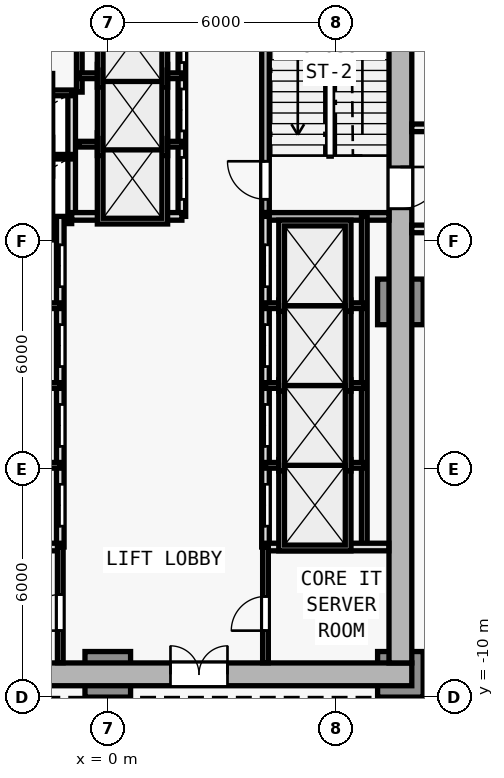
"""IFC4 building model, lengths in metres.
Left out: names, types, materials, properties, quantities, classifications, styles, units other than length and angle.
Written with IfcOpenShell. Run it as: python <this file> out.ifc"""

import sys

from ifc_helpers import new_model, si_unit, direction, frame, frame_2d, origin, origin_2d, place, context, subcontext, project, spatial, rectangle, extrude, element, fill, save


model = new_model("IFC4")
c1 = context("Model", 3, precision=1e-05, world=origin(), true_north=direction((0.0, 1.0)))
c2 = subcontext(c1, "Body", "Model", "MODEL_VIEW")
j1 = project(units=[si_unit("LENGTHUNIT", "METRE"), si_unit("PLANEANGLEUNIT", "RADIAN")], contexts=[c1])
p1 = place(None, origin())
s1 = spatial("IfcSite", under=j1, at=p1, CompositionType="ELEMENT")
p2 = place(p1, origin())
s2 = spatial("IfcBuilding", under=s1, at=p2, CompositionType="ELEMENT")
p3 = place(p2, origin())
s3 = spatial("IfcBuildingStorey", under=s2, at=p3, CompositionType="ELEMENT", Elevation=0.0)
for number, where, z_axis, x_axis in (
    (1, (7.7, -9.4, 0.0), (0.0, 0.0, 1.0), (1.0, 0.0, 0.0)),
    (2, (0.0, -9.4, 0.0), (0.0, 0.0, 1.0), (1.0, 0.0, 0.0)),
    (3, (7.7, 0.4, 0.0), (0.0, 0.0, 1.0), (1.0, 0.0, 0.0)),
):
    element("IfcColumn", number, at=place(p3, frame(where, z_axis=z_axis, x_axis=x_axis)), inside=s3, PredefinedType="COLUMN", context=c2, shape_type="SweptSolid", body=[
        extrude(rectangle(XDim=1.2, YDim=1.2, at=origin_2d()), origin(), (0.0, 0.0, 1.0), 5.0),
    ])
p4 = place(p3, frame((-8.0, -9.4, 0.0), z_axis=(0.0, 0.0, 1.0), x_axis=(1.0, 0.0, 0.0)))
e4 = element("IfcWall", 4, at=p4, inside=s3, PredefinedType="SHEAR", context=c2, shape_type="SweptSolid", body=[
    extrude(rectangle(XDim=16.0, YDim=0.6, at=frame_2d((8.0, 0.0))), origin(), (0.0, 0.0, 1.0), 4.72),
])
p5 = place(p4, frame((9.65, 0.0, 0.0)))
e5 = element("IfcOpeningElement", 5, at=p5, cuts=e4, PredefinedType="OPENING", context=c2, shape_type="SweptSolid", body=[
    extrude(rectangle(XDim=1.5, YDim=2.2, at=frame_2d((0.75, 1.1))), frame((0.0, 0.31, 0.0), z_axis=(0.0, -1.0, 0.0), x_axis=(1.0, 0.0, 0.0)), (0.0, 0.0, 1.0), 0.62),
])
p6 = place(p3, frame((7.7, 9.9, 0.0), z_axis=(0.0, 0.0, 1.0), x_axis=(0.0, -1.0, 0.0)))
e6 = element("IfcWall", 6, at=p6, inside=s3, PredefinedType="SHEAR", context=c2, shape_type="SweptSolid", body=[
    extrude(rectangle(XDim=19.0, YDim=0.6, at=frame_2d((9.5, 0.0))), origin(), (0.0, 0.0, 1.0), 4.72),
])
p7 = place(p6, frame((5.95, 0.0, 0.0)))
e7 = element("IfcOpeningElement", 7, at=p7, cuts=e6, PredefinedType="OPENING", context=c2, shape_type="SweptSolid", body=[
    extrude(rectangle(XDim=1.1, YDim=2.15, at=frame_2d((0.55, 1.075))), frame((0.0, 0.31, 0.0), z_axis=(0.0, -1.0, 0.0), x_axis=(1.0, 0.0, 0.0)), (0.0, 0.0, 1.0), 0.62),
])
p8 = place(p3, frame((4.15, 2.75, 0.0), z_axis=(0.0, 0.0, 1.0), x_axis=(0.0, 1.0, 0.0)))
e8 = element("IfcWall", 8, at=p8, inside=s3, PredefinedType="SOLIDWALL", context=c2, shape_type="SweptSolid", body=[
    extrude(rectangle(XDim=7.15, YDim=0.2, at=frame_2d((3.575, 0.0))), origin(), (0.0, 0.0, 1.0), 4.72),
])
p9 = place(p8, frame((0.35, 0.0, 0.0)))
e9 = element("IfcOpeningElement", 9, at=p9, cuts=e8, PredefinedType="OPENING", context=c2, shape_type="SweptSolid", body=[
    extrude(rectangle(XDim=1.0, YDim=2.15, at=frame_2d((0.5, 1.075))), frame((0.0, 0.11, 0.0), z_axis=(0.0, -1.0, 0.0), x_axis=(1.0, 0.0, 0.0)), (0.0, 0.0, 1.0), 0.22),
])
p10 = place(p3, frame((4.05, 2.65, 0.0), z_axis=(0.0, 0.0, 1.0), x_axis=(1.0, 0.0, 0.0)))
e10 = element("IfcWall", 10, at=p10, inside=s3, PredefinedType="SOLIDWALL", context=c2, shape_type="SweptSolid", body=[
    extrude(rectangle(XDim=3.35, YDim=0.2, at=frame_2d((1.675, 0.0))), origin(), (0.0, 0.0, 1.0), 4.72),
])
p11 = place(p3, frame((-0.95, 2.65, 0.0), z_axis=(0.0, 0.0, 1.0), x_axis=(0.0, 1.0, 0.0)))
e11 = element("IfcWall", 11, at=p11, inside=s3, PredefinedType="SOLIDWALL", context=c2, shape_type="SweptSolid", body=[
    extrude(rectangle(XDim=3.27, YDim=0.2, at=frame_2d((1.635, 0.0))), origin(), (0.0, 0.0, 1.0), 4.72),
])
for number, where, z_axis, x_axis in (
    (12, (-3.85, 2.52, 0.0), (0.0, 0.0, 1.0), (1.0, 0.0, 0.0)),
    (13, (-3.85, 4.22, 0.0), (0.0, 0.0, 1.0), (1.0, 0.0, 0.0)),
):
    element("IfcWall", number, at=place(p3, frame(where, z_axis=z_axis, x_axis=x_axis)), inside=s3, PredefinedType="PARTITIONING", context=c2, shape_type="SweptSolid", body=[
        extrude(rectangle(XDim=2.9, YDim=0.12, at=frame_2d((1.45, 0.0))), origin(), (0.0, 0.0, 1.0), 4.72),
    ])
p12 = place(p3, frame((-3.85, 5.9, 0.0), z_axis=(0.0, 0.0, 1.0), x_axis=(1.0, 0.0, 0.0)))
e14 = element("IfcWall", 14, at=p12, inside=s3, PredefinedType="PARTITIONING", context=c2, shape_type="SweptSolid", body=[
    extrude(rectangle(XDim=2.9, YDim=0.15, at=frame_2d((1.45, 0.0))), origin(), (0.0, 0.0, 1.0), 4.72),
])
p13 = place(p3, frame((4.15, -6.05, 0.0), z_axis=(0.0, 0.0, 1.0), x_axis=(0.0, 1.0, 0.0)))
e15 = element("IfcWall", 15, at=p13, inside=s3, PredefinedType="SOLIDWALL", context=c2, shape_type="SweptSolid", body=[
    extrude(rectangle(XDim=8.7, YDim=0.2, at=frame_2d((4.35, 0.0))), origin(), (0.0, 0.0, 1.0), 4.72),
])
p14 = place(p13, frame((0.55, 0.0, 0.0)))
e16 = element("IfcOpeningElement", 16, at=p14, cuts=e15, PredefinedType="OPENING", context=c2, shape_type="SweptSolid", body=[
    extrude(rectangle(XDim=1.1, YDim=2.15, at=frame_2d((0.55, 1.075))), frame((0.0, 0.11, 0.0), z_axis=(0.0, -1.0, 0.0), x_axis=(1.0, 0.0, 0.0)), (0.0, 0.0, 1.0), 0.22),
])
p15 = place(p13, frame((2.65, 0.0, 0.0)))
e17 = element("IfcOpeningElement", 17, at=p15, cuts=e15, PredefinedType="OPENING", context=c2, shape_type="SweptSolid", body=[
    extrude(rectangle(XDim=1.1, YDim=2.15, at=frame_2d((0.55, 1.075))), frame((0.0, 0.11, 0.0), z_axis=(0.0, -1.0, 0.0), x_axis=(1.0, 0.0, 0.0)), (0.0, 0.0, 1.0), 0.22),
])
p16 = place(p13, frame((4.75, 0.0, 0.0)))
e18 = element("IfcOpeningElement", 18, at=p16, cuts=e15, PredefinedType="OPENING", context=c2, shape_type="SweptSolid", body=[
    extrude(rectangle(XDim=1.1, YDim=2.15, at=frame_2d((0.55, 1.075))), frame((0.0, 0.11, 0.0), z_axis=(0.0, -1.0, 0.0), x_axis=(1.0, 0.0, 0.0)), (0.0, 0.0, 1.0), 0.22),
])
p17 = place(p13, frame((6.85, 0.0, 0.0)))
e19 = element("IfcOpeningElement", 19, at=p17, cuts=e15, PredefinedType="OPENING", context=c2, shape_type="SweptSolid", body=[
    extrude(rectangle(XDim=1.1, YDim=2.15, at=frame_2d((0.55, 1.075))), frame((0.0, 0.11, 0.0), z_axis=(0.0, -1.0, 0.0), x_axis=(1.0, 0.0, 0.0)), (0.0, 0.0, 1.0), 0.22),
])
p18 = place(p3, frame((6.75, -6.05, 0.0), z_axis=(0.0, 0.0, 1.0), x_axis=(0.0, 1.0, 0.0)))
e20 = element("IfcWall", 20, at=p18, inside=s3, PredefinedType="PARTITIONING", context=c2, shape_type="SweptSolid", body=[
    extrude(rectangle(XDim=8.7, YDim=0.15, at=frame_2d((4.35, 0.0))), origin(), (0.0, 0.0, 1.0), 4.72),
])
for number, where, z_axis, x_axis in (
    (21, (4.15, -3.9, 0.0), (0.0, 0.0, 1.0), (1.0, 0.0, 0.0)),
    (22, (4.15, -1.8, 0.0), (0.0, 0.0, 1.0), (1.0, 0.0, 0.0)),
    (23, (4.15, 0.3, 0.0), (0.0, 0.0, 1.0), (1.0, 0.0, 0.0)),
):
    element("IfcWall", number, at=place(p3, frame(where, z_axis=z_axis, x_axis=x_axis)), inside=s3, PredefinedType="PARTITIONING", context=c2, shape_type="SweptSolid", body=[
        extrude(rectangle(XDim=2.6, YDim=0.15, at=frame_2d((1.3, 0.0))), origin(), (0.0, 0.0, 1.0), 4.72),
    ])
p19 = place(p3, frame((-1.25, -6.05, 0.0), z_axis=(0.0, 0.0, 1.0), x_axis=(0.0, 1.0, 0.0)))
e24 = element("IfcWall", 24, at=p19, inside=s3, PredefinedType="SOLIDWALL", context=c2, shape_type="SweptSolid", body=[
    extrude(rectangle(XDim=8.7, YDim=0.2, at=frame_2d((4.35, 0.0))), origin(), (0.0, 0.0, 1.0), 4.72),
])
p20 = place(p19, frame((0.55, 0.0, 0.0)))
e25 = element("IfcOpeningElement", 25, at=p20, cuts=e24, PredefinedType="OPENING", context=c2, shape_type="SweptSolid", body=[
    extrude(rectangle(XDim=1.1, YDim=2.15, at=frame_2d((0.55, 1.075))), frame((0.0, 0.11, 0.0), z_axis=(0.0, -1.0, 0.0), x_axis=(1.0, 0.0, 0.0)), (0.0, 0.0, 1.0), 0.22),
])
p21 = place(p19, frame((2.65, 0.0, 0.0)))
e26 = element("IfcOpeningElement", 26, at=p21, cuts=e24, PredefinedType="OPENING", context=c2, shape_type="SweptSolid", body=[
    extrude(rectangle(XDim=1.1, YDim=2.15, at=frame_2d((0.55, 1.075))), frame((0.0, 0.11, 0.0), z_axis=(0.0, -1.0, 0.0), x_axis=(1.0, 0.0, 0.0)), (0.0, 0.0, 1.0), 0.22),
])
p22 = place(p19, frame((4.75, 0.0, 0.0)))
e27 = element("IfcOpeningElement", 27, at=p22, cuts=e24, PredefinedType="OPENING", context=c2, shape_type="SweptSolid", body=[
    extrude(rectangle(XDim=1.1, YDim=2.15, at=frame_2d((0.55, 1.075))), frame((0.0, 0.11, 0.0), z_axis=(0.0, -1.0, 0.0), x_axis=(1.0, 0.0, 0.0)), (0.0, 0.0, 1.0), 0.22),
])
p23 = place(p19, frame((6.85, 0.0, 0.0)))
e28 = element("IfcOpeningElement", 28, at=p23, cuts=e24, PredefinedType="OPENING", context=c2, shape_type="SweptSolid", body=[
    extrude(rectangle(XDim=1.1, YDim=2.15, at=frame_2d((0.55, 1.075))), frame((0.0, 0.11, 0.0), z_axis=(0.0, -1.0, 0.0), x_axis=(1.0, 0.0, 0.0)), (0.0, 0.0, 1.0), 0.22),
])
for number, where, z_axis, x_axis in (
    (29, (-4.15, -3.9, 0.0), (0.0, 0.0, 1.0), (1.0, 0.0, 0.0)),
    (30, (-4.15, -1.8, 0.0), (0.0, 0.0, 1.0), (1.0, 0.0, 0.0)),
    (31, (-4.15, 0.3, 0.0), (0.0, 0.0, 1.0), (1.0, 0.0, 0.0)),
):
    element("IfcWall", number, at=place(p3, frame(where, z_axis=z_axis, x_axis=x_axis)), inside=s3, PredefinedType="PARTITIONING", context=c2, shape_type="SweptSolid", body=[
        extrude(rectangle(XDim=2.9, YDim=0.15, at=frame_2d((1.45, 0.0))), origin(), (0.0, 0.0, 1.0), 4.72),
    ])
p24 = place(p3, frame((1.95, 2.65, 0.0), z_axis=(0.0, 0.0, 1.0), x_axis=(0.0, 1.0, 0.0)))
e32 = element("IfcWall", 32, at=p24, inside=s3, PredefinedType="SOLIDWALL", context=c2, shape_type="SweptSolid", body=[
    extrude(rectangle(XDim=7.245, YDim=0.2, at=frame_2d((3.623, 0.0))), origin(), (0.0, 0.0, 1.0), 4.72),
])
p25 = place(p24, frame((0.45, 0.0, 0.0)))
e33 = element("IfcOpeningElement", 33, at=p25, cuts=e32, PredefinedType="OPENING", context=c2, shape_type="SweptSolid", body=[
    extrude(rectangle(XDim=1.1, YDim=2.15, at=frame_2d((0.55, 1.075))), frame((0.0, 0.11, 0.0), z_axis=(0.0, -1.0, 0.0), x_axis=(1.0, 0.0, 0.0)), (0.0, 0.0, 1.0), 0.22),
])
p26 = place(p24, frame((2.25, 0.0, 0.0)))
e34 = element("IfcOpeningElement", 34, at=p26, cuts=e32, PredefinedType="OPENING", context=c2, shape_type="SweptSolid", body=[
    extrude(rectangle(XDim=1.1, YDim=2.15, at=frame_2d((0.55, 1.075))), frame((0.0, 0.11, 0.0), z_axis=(0.0, -1.0, 0.0), x_axis=(1.0, 0.0, 0.0)), (0.0, 0.0, 1.0), 0.22),
])
p27 = place(p24, frame((4.05, 0.0, 0.0)))
e35 = element("IfcOpeningElement", 35, at=p27, cuts=e32, PredefinedType="OPENING", context=c2, shape_type="SweptSolid", body=[
    extrude(rectangle(XDim=1.1, YDim=2.15, at=frame_2d((0.55, 1.075))), frame((0.0, 0.11, 0.0), z_axis=(0.0, -1.0, 0.0), x_axis=(1.0, 0.0, 0.0)), (0.0, 0.0, 1.0), 0.22),
])
p28 = place(p24, frame((5.85, 0.0, 0.0)))
e36 = element("IfcOpeningElement", 36, at=p28, cuts=e32, PredefinedType="OPENING", context=c2, shape_type="SweptSolid", body=[
    extrude(rectangle(XDim=1.1, YDim=2.15, at=frame_2d((0.55, 1.075))), frame((0.0, 0.11, 0.0), z_axis=(0.0, -1.0, 0.0), x_axis=(1.0, 0.0, 0.0)), (0.0, 0.0, 1.0), 0.22),
])
p29 = place(p3, frame((-0.95, 2.65, 0.0), z_axis=(0.0, 0.0, 1.0), x_axis=(1.0, 0.0, 0.0)))
e37 = element("IfcWall", 37, at=p29, inside=s3, PredefinedType="SOLIDWALL", context=c2, shape_type="SweptSolid", body=[
    extrude(rectangle(XDim=2.9, YDim=0.2, at=frame_2d((1.45, 0.0))), origin(), (0.0, 0.0, 1.0), 4.72),
])
p30 = place(p3, frame((-0.75, 5.92, 0.0), z_axis=(0.0, 0.0, 1.0), x_axis=(0.0, 1.0, 0.0)))
e38 = element("IfcWall", 38, at=p30, inside=s3, PredefinedType="PARTITIONING", context=c2, shape_type="SweptSolid", body=[
    extrude(rectangle(XDim=3.975, YDim=0.15, at=frame_2d((1.988, 0.0))), origin(), (0.0, 0.0, 1.0), 4.72),
])
for number, where, z_axis, x_axis in (
    (39, (-0.75, 4.55, 0.0), (0.0, 0.0, 1.0), (1.0, 0.0, 0.0)),
    (40, (-0.75, 6.35, 0.0), (0.0, 0.0, 1.0), (1.0, 0.0, 0.0)),
):
    element("IfcWall", number, at=place(p3, frame(where, z_axis=z_axis, x_axis=x_axis)), inside=s3, PredefinedType="PARTITIONING", context=c2, shape_type="SweptSolid", body=[
        extrude(rectangle(XDim=2.7, YDim=0.15, at=frame_2d((1.35, 0.0))), origin(), (0.0, 0.0, 1.0), 4.72),
    ])
p31 = place(p3, frame((-4.04, -6.05, 0.0), z_axis=(0.0, 0.0, 1.0), x_axis=(1.0, 0.0, 0.0)))
e41 = element("IfcWall", 41, at=p31, inside=s3, PredefinedType="SOLIDWALL", context=c2, shape_type="SweptSolid", body=[
    extrude(rectangle(XDim=2.79, YDim=0.2, at=frame_2d((1.395, 0.0))), origin(), (0.0, 0.0, 1.0), 4.72),
])
p32 = place(p3, frame((4.15, -6.05, 0.0), z_axis=(0.0, 0.0, 1.0), x_axis=(1.0, 0.0, 0.0)))
e42 = element("IfcWall", 42, at=p32, inside=s3, PredefinedType="SOLIDWALL", context=c2, shape_type="SweptSolid", body=[
    extrude(rectangle(XDim=3.245, YDim=0.2, at=frame_2d((1.623, 0.0))), origin(), (0.0, 0.0, 1.0), 4.72),
])
p33 = place(p3, frame((-1.25, -9.095, 0.0), z_axis=(0.0, 0.0, 1.0), x_axis=(0.0, 1.0, 0.0)))
e43 = element("IfcWall", 43, at=p33, inside=s3, PredefinedType="PARTITIONING", context=c2, shape_type="SweptSolid", body=[
    extrude(rectangle(XDim=3.045, YDim=0.15, at=frame_2d((1.522, 0.0))), origin(), (0.0, 0.0, 1.0), 4.72),
])
p34 = place(p33, frame((0.845, 0.0, 0.0)))
e44 = element("IfcOpeningElement", 44, at=p34, cuts=e43, PredefinedType="OPENING", context=c2, shape_type="SweptSolid", body=[
    extrude(rectangle(XDim=0.95, YDim=2.1, at=frame_2d((0.475, 1.05))), frame((0.0, 0.085, 0.0), z_axis=(0.0, -1.0, 0.0), x_axis=(1.0, 0.0, 0.0)), (0.0, 0.0, 1.0), 0.17),
])
p35 = place(p3, frame((4.15, -9.095, 0.0), z_axis=(0.0, 0.0, 1.0), x_axis=(0.0, 1.0, 0.0)))
e45 = element("IfcWall", 45, at=p35, inside=s3, PredefinedType="PARTITIONING", context=c2, shape_type="SweptSolid", body=[
    extrude(rectangle(XDim=3.045, YDim=0.15, at=frame_2d((1.522, 0.0))), origin(), (0.0, 0.0, 1.0), 4.72),
])
p36 = place(p35, frame((0.845, 0.0, 0.0)))
e46 = element("IfcOpeningElement", 46, at=p36, cuts=e45, PredefinedType="OPENING", context=c2, shape_type="SweptSolid", body=[
    extrude(rectangle(XDim=0.9, YDim=2.1, at=frame_2d((0.45, 1.05))), frame((0.0, 0.085, 0.0), z_axis=(0.0, -1.0, 0.0), x_axis=(1.0, 0.0, 0.0)), (0.0, 0.0, 1.0), 0.17),
])
p37 = place(p3, frame((8.0, 2.32, 0.0), z_axis=(0.0, 0.0, 1.0), x_axis=(1.0, 0.0, 0.0)))
e47 = element("IfcWall", 47, at=p37, inside=s3, PredefinedType="SOLIDWALL", context=c2, shape_type="SweptSolid", body=[
    extrude(rectangle(XDim=32.82, YDim=0.2, at=frame_2d((16.41, 0.0))), origin(), (0.0, 0.0, 1.0), 3.881),
])
p38 = place(p3, frame((8.0, 4.98, 0.0), z_axis=(0.0, 0.0, 1.0), x_axis=(1.0, 0.0, 0.0)))
e48 = element("IfcWall", 48, at=p38, inside=s3, PredefinedType="SOLIDWALL", context=c2, shape_type="SweptSolid", body=[
    extrude(rectangle(XDim=32.82, YDim=0.2, at=frame_2d((16.41, 0.0))), origin(), (0.0, 0.0, 1.0), 4.105),
])
p39 = place(p38, frame((5.7, 0.0, 0.0)))
e49 = element("IfcOpeningElement", 49, at=p39, cuts=e48, PredefinedType="OPENING", context=c2, shape_type="SweptSolid", body=[
    extrude(rectangle(XDim=1.4, YDim=2.2, at=frame_2d((0.7, 1.1))), frame((0.0, 0.11, 0.0), z_axis=(0.0, -1.0, 0.0), x_axis=(1.0, 0.0, 0.0)), (0.0, 0.0, 1.0), 0.22),
])
p40 = place(p5, origin())
e50 = element("IfcDoor", 50, at=p40, inside=s3, OperationType="DOUBLE_DOOR_SINGLE_SWING", PredefinedType="DOOR", context=c2, shape_type="SweptSolid", body=[
    extrude(rectangle(XDim=1.5, YDim=2.2, at=frame_2d((0.75, 1.1))), frame((0.0, 0.025, 0.0), z_axis=(0.0, -1.0, 0.0), x_axis=(1.0, 0.0, 0.0)), (0.0, 0.0, 1.0), 0.05),
])
fill(e5, e50)
p41 = place(p7, origin())
e51 = element("IfcDoor", 51, at=p41, inside=s3, OperationType="SINGLE_SWING_LEFT", PredefinedType="DOOR", context=c2, shape_type="SweptSolid", body=[
    extrude(rectangle(XDim=1.1, YDim=2.15, at=frame_2d((0.55, 1.075))), frame((0.0, 0.025, 0.0), z_axis=(0.0, -1.0, 0.0), x_axis=(1.0, 0.0, 0.0)), (0.0, 0.0, 1.0), 0.05),
])
fill(e7, e51)
p42 = place(p9, origin())
e52 = element("IfcDoor", 52, at=p42, inside=s3, OperationType="SINGLE_SWING_RIGHT", PredefinedType="DOOR", context=c2, shape_type="SweptSolid", body=[
    extrude(rectangle(XDim=1.0, YDim=2.15, at=frame_2d((0.5, 1.075))), frame((0.0, 0.025, 0.0), z_axis=(0.0, -1.0, 0.0), x_axis=(1.0, 0.0, 0.0)), (0.0, 0.0, 1.0), 0.05),
])
fill(e9, e52)
p43 = place(p14, origin())
e53 = element("IfcDoor", 53, at=p43, inside=s3, OperationType="DOUBLE_DOOR_SLIDING", PredefinedType="DOOR", context=c2, shape_type="SweptSolid", body=[
    extrude(rectangle(XDim=1.1, YDim=2.15, at=frame_2d((0.55, 1.075))), frame((0.0, 0.025, 0.0), z_axis=(0.0, -1.0, 0.0), x_axis=(1.0, 0.0, 0.0)), (0.0, 0.0, 1.0), 0.05),
])
fill(e16, e53)
p44 = place(p15, origin())
e54 = element("IfcDoor", 54, at=p44, inside=s3, OperationType="DOUBLE_DOOR_SLIDING", PredefinedType="DOOR", context=c2, shape_type="SweptSolid", body=[
    extrude(rectangle(XDim=1.1, YDim=2.15, at=frame_2d((0.55, 1.075))), frame((0.0, 0.025, 0.0), z_axis=(0.0, -1.0, 0.0), x_axis=(1.0, 0.0, 0.0)), (0.0, 0.0, 1.0), 0.05),
])
fill(e17, e54)
p45 = place(p16, origin())
e55 = element("IfcDoor", 55, at=p45, inside=s3, OperationType="DOUBLE_DOOR_SLIDING", PredefinedType="DOOR", context=c2, shape_type="SweptSolid", body=[
    extrude(rectangle(XDim=1.1, YDim=2.15, at=frame_2d((0.55, 1.075))), frame((0.0, 0.025, 0.0), z_axis=(0.0, -1.0, 0.0), x_axis=(1.0, 0.0, 0.0)), (0.0, 0.0, 1.0), 0.05),
])
fill(e18, e55)
p46 = place(p17, origin())
e56 = element("IfcDoor", 56, at=p46, inside=s3, OperationType="DOUBLE_DOOR_SLIDING", PredefinedType="DOOR", context=c2, shape_type="SweptSolid", body=[
    extrude(rectangle(XDim=1.1, YDim=2.15, at=frame_2d((0.55, 1.075))), frame((0.0, 0.025, 0.0), z_axis=(0.0, -1.0, 0.0), x_axis=(1.0, 0.0, 0.0)), (0.0, 0.0, 1.0), 0.05),
])
fill(e19, e56)
p47 = place(p20, origin())
e57 = element("IfcDoor", 57, at=p47, inside=s3, OperationType="DOUBLE_DOOR_SLIDING", PredefinedType="DOOR", context=c2, shape_type="SweptSolid", body=[
    extrude(rectangle(XDim=1.1, YDim=2.15, at=frame_2d((0.55, 1.075))), frame((0.0, 0.025, 0.0), z_axis=(0.0, -1.0, 0.0), x_axis=(1.0, 0.0, 0.0)), (0.0, 0.0, 1.0), 0.05),
])
fill(e25, e57)
p48 = place(p21, origin())
e58 = element("IfcDoor", 58, at=p48, inside=s3, OperationType="DOUBLE_DOOR_SLIDING", PredefinedType="DOOR", context=c2, shape_type="SweptSolid", body=[
    extrude(rectangle(XDim=1.1, YDim=2.15, at=frame_2d((0.55, 1.075))), frame((0.0, 0.025, 0.0), z_axis=(0.0, -1.0, 0.0), x_axis=(1.0, 0.0, 0.0)), (0.0, 0.0, 1.0), 0.05),
])
fill(e26, e58)
p49 = place(p22, origin())
e59 = element("IfcDoor", 59, at=p49, inside=s3, OperationType="DOUBLE_DOOR_SLIDING", PredefinedType="DOOR", context=c2, shape_type="SweptSolid", body=[
    extrude(rectangle(XDim=1.1, YDim=2.15, at=frame_2d((0.55, 1.075))), frame((0.0, 0.025, 0.0), z_axis=(0.0, -1.0, 0.0), x_axis=(1.0, 0.0, 0.0)), (0.0, 0.0, 1.0), 0.05),
])
fill(e27, e59)
p50 = place(p23, origin())
e60 = element("IfcDoor", 60, at=p50, inside=s3, OperationType="DOUBLE_DOOR_SLIDING", PredefinedType="DOOR", context=c2, shape_type="SweptSolid", body=[
    extrude(rectangle(XDim=1.1, YDim=2.15, at=frame_2d((0.55, 1.075))), frame((0.0, 0.025, 0.0), z_axis=(0.0, -1.0, 0.0), x_axis=(1.0, 0.0, 0.0)), (0.0, 0.0, 1.0), 0.05),
])
fill(e28, e60)
p51 = place(p25, origin())
e61 = element("IfcDoor", 61, at=p51, inside=s3, OperationType="DOUBLE_DOOR_SLIDING", PredefinedType="DOOR", context=c2, shape_type="SweptSolid", body=[
    extrude(rectangle(XDim=1.1, YDim=2.15, at=frame_2d((0.55, 1.075))), frame((0.0, 0.025, 0.0), z_axis=(0.0, -1.0, 0.0), x_axis=(1.0, 0.0, 0.0)), (0.0, 0.0, 1.0), 0.05),
])
fill(e33, e61)
p52 = place(p26, origin())
e62 = element("IfcDoor", 62, at=p52, inside=s3, OperationType="DOUBLE_DOOR_SLIDING", PredefinedType="DOOR", context=c2, shape_type="SweptSolid", body=[
    extrude(rectangle(XDim=1.1, YDim=2.15, at=frame_2d((0.55, 1.075))), frame((0.0, 0.025, 0.0), z_axis=(0.0, -1.0, 0.0), x_axis=(1.0, 0.0, 0.0)), (0.0, 0.0, 1.0), 0.05),
])
fill(e34, e62)
p53 = place(p27, origin())
e63 = element("IfcDoor", 63, at=p53, inside=s3, OperationType="DOUBLE_DOOR_SLIDING", PredefinedType="DOOR", context=c2, shape_type="SweptSolid", body=[
    extrude(rectangle(XDim=1.1, YDim=2.15, at=frame_2d((0.55, 1.075))), frame((0.0, 0.025, 0.0), z_axis=(0.0, -1.0, 0.0), x_axis=(1.0, 0.0, 0.0)), (0.0, 0.0, 1.0), 0.05),
])
fill(e35, e63)
p54 = place(p34, origin())
e64 = element("IfcDoor", 64, at=p54, inside=s3, OperationType="SINGLE_SWING_LEFT", PredefinedType="DOOR", context=c2, shape_type="SweptSolid", body=[
    extrude(rectangle(XDim=0.95, YDim=2.1, at=frame_2d((0.475, 1.05))), frame((0.0, 0.025, 0.0), z_axis=(0.0, -1.0, 0.0), x_axis=(1.0, 0.0, 0.0)), (0.0, 0.0, 1.0), 0.05),
])
fill(e44, e64)
p55 = place(p36, origin())
e65 = element("IfcDoor", 65, at=p55, inside=s3, OperationType="SINGLE_SWING_LEFT", PredefinedType="DOOR", context=c2, shape_type="SweptSolid", body=[
    extrude(rectangle(XDim=0.9, YDim=2.1, at=frame_2d((0.45, 1.05))), frame((0.0, 0.025, 0.0), z_axis=(0.0, -1.0, 0.0), x_axis=(1.0, 0.0, 0.0)), (0.0, 0.0, 1.0), 0.05),
])
fill(e46, e65)
save(model, sys.argv[1])
